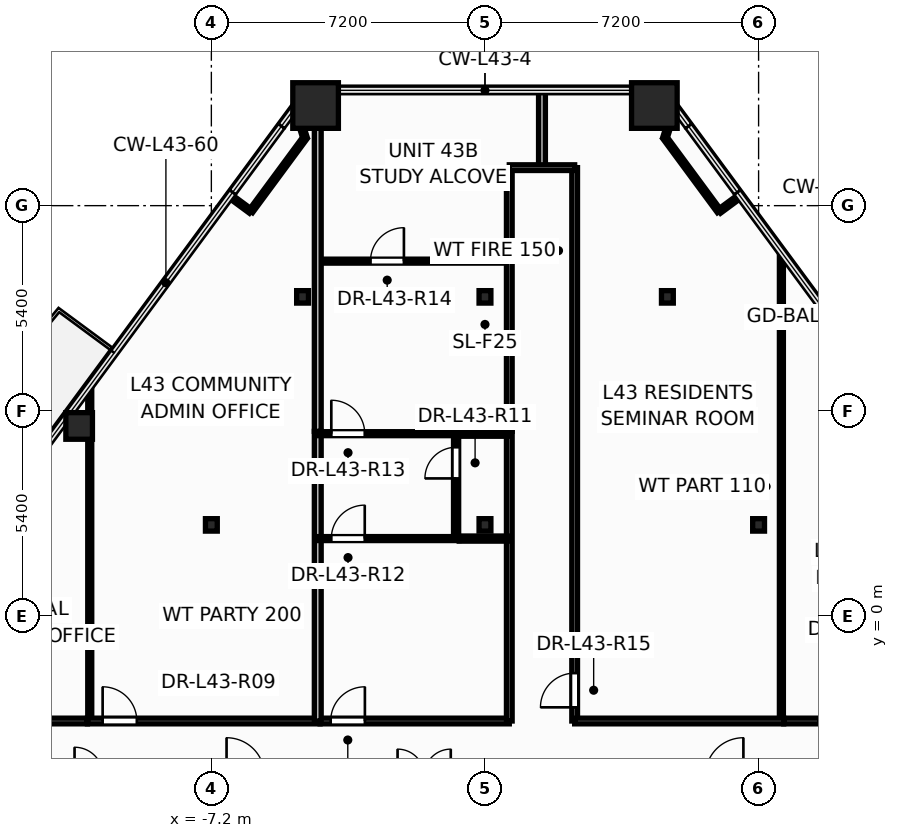
"""IFC4 building model, lengths in metres.
Left out: names, types, materials, properties, quantities, classifications, styles, units other than length and angle.
Written with IfcOpenShell. Run it as: python <this file> out.ifc"""

import sys

from ifc_helpers import new_model, si_unit, direction, frame, frame_2d, origin, origin_2d, place, context, subcontext, project, spatial, rectangle, hollow_rectangle, hollow_circle, i_section, extrude, element, fill, save


model = new_model("IFC4")
c1 = context("Model", 3, precision=1e-05, world=origin(), true_north=direction((0.0, 1.0)))
c2 = subcontext(c1, "Body", "Model", "MODEL_VIEW")
j1 = project(units=[si_unit("LENGTHUNIT", "METRE"), si_unit("PLANEANGLEUNIT", "RADIAN")], contexts=[c1])
p1 = place(None, origin())
s1 = spatial("IfcSite", under=j1, at=p1, CompositionType="ELEMENT")
p2 = place(p1, origin())
s2 = spatial("IfcBuilding", under=s1, at=p2, CompositionType="ELEMENT")
p3 = place(p2, frame((0.0, 0.0, 165.3)))
s3 = spatial("IfcBuildingStorey", under=s2, at=p3, CompositionType="ELEMENT", Elevation=165.3)
for number, where, z_axis, x_axis in (
    (1, (4.457, 13.435, 0.0), (0.0, 0.0, 1.0), (1.0, 0.0, 0.0)),
    (2, (-4.457, 13.435, 0.0), (0.0, 0.0, 1.0), (1.0, 0.0, 0.0)),
):
    element("IfcColumn", number, at=place(p3, frame(where, z_axis=z_axis, x_axis=x_axis)), inside=s3, PredefinedType="COLUMN", context=c2, shape_type="SweptSolid", body=[
        extrude(hollow_rectangle(XDim=1.2, YDim=1.2, WallThickness=0.055, at=origin_2d()), origin(), (0.0, 0.0, 1.0), 3.6),
    ])
p4 = place(p3, frame((-10.679, 5.003, 0.0), z_axis=(0.0, 0.0, 1.0), x_axis=(1.0, 0.0, 0.0)))
e3 = element("IfcColumn", 3, at=p4, inside=s3, PredefinedType="COLUMN", context=c2, shape_type="SweptSolid", body=[
    extrude(hollow_circle(Radius=0.35, WallThickness=0.03, at=origin_2d()), origin(), (0.0, 0.0, 1.0), 3.6),
])
for number, where, z_axis, x_axis in (
    (4, (-7.2, 2.4, 0.0), (0.0, 0.0, 1.0), (1.0, 0.0, 0.0)),
    (5, (0.0, 2.4, 0.0), (0.0, 0.0, 1.0), (1.0, 0.0, 0.0)),
    (6, (7.2, 2.4, 0.0), (0.0, 0.0, 1.0), (1.0, 0.0, 0.0)),
    (7, (-4.8, 8.4, 0.0), (0.0, 0.0, 1.0), (1.0, 0.0, 0.0)),
    (8, (0.0, 8.4, 0.0), (0.0, 0.0, 1.0), (1.0, 0.0, 0.0)),
    (9, (4.8, 8.4, 0.0), (0.0, 0.0, 1.0), (1.0, 0.0, 0.0)),
):
    element("IfcColumn", number, at=place(p3, frame(where, z_axis=z_axis, x_axis=x_axis)), inside=s3, PredefinedType="COLUMN", context=c2, shape_type="SweptSolid", body=[
        extrude(i_section(OverallWidth=0.311, OverallDepth=0.327, WebThickness=0.016, FlangeThickness=0.025, at=origin_2d()), origin(), (0.0, 0.0, 1.0), 3.6),
    ])
p5 = place(p3, frame((2.36, -2.76, 0.0), z_axis=(0.0, 0.0, 1.0), x_axis=(0.0, 1.0, 0.0)))
e10 = element("IfcWall", 10, at=p5, inside=s3, PredefinedType="PARTITIONING", context=c2, shape_type="SweptSolid", body=[
    extrude(rectangle(XDim=14.56, YDim=0.15, at=frame_2d((7.28, 0.0))), origin(), (0.0, 0.0, 1.0), 2.255),
])
p6 = place(p5, frame((0.36, 0.0, 0.0)))
e11 = element("IfcOpeningElement", 11, at=p6, cuts=e10, PredefinedType="OPENING", context=c2, shape_type="SweptSolid", body=[
    extrude(rectangle(XDim=0.906, YDim=2.104, at=frame_2d((0.45, 1.052))), frame((0.0, 0.085, 0.0), z_axis=(0.0, -1.0, 0.0), x_axis=(1.0, 0.0, 0.0)), (0.0, 0.0, 1.0), 0.17),
])
p7 = place(p3, frame((7.8, -2.76, 0.0), z_axis=(0.0, 0.0, 1.0), x_axis=(0.0, 1.0, 0.0)))
e12 = element("IfcWall", 12, at=p7, inside=s3, PredefinedType="PARTITIONING", context=c2, shape_type="SweptSolid", body=[
    extrude(rectangle(XDim=12.338, YDim=0.105, at=frame_2d((6.169, 0.0))), origin(), (0.0, 0.0, 1.0), 2.547),
])
p8 = place(p3, frame((-10.4, -2.76, 0.0), z_axis=(0.0, 0.0, 1.0), x_axis=(0.0, 1.0, 0.0)))
e13 = element("IfcWall", 13, at=p8, inside=s3, PredefinedType="PARTITIONING", context=c2, shape_type="SweptSolid", body=[
    extrude(rectangle(XDim=8.815, YDim=0.105, at=frame_2d((4.408, 0.0))), origin(), (0.0, 0.0, 1.0), 2.547),
])
p9 = place(p3, frame((-10.46, -2.76, 0.0), z_axis=(0.0, 0.0, 1.0), x_axis=(1.0, 0.0, 0.0)))
e14 = element("IfcWall", 14, at=p9, inside=s3, PredefinedType="PARTITIONING", context=c2, shape_type="SweptSolid", body=[
    extrude(rectangle(XDim=6.12, YDim=0.15, at=frame_2d((3.06, 0.0))), origin(), (0.0, 0.0, 1.0), 2.255),
])
p10 = place(p9, frame((0.399, 0.0, 0.0)))
e15 = element("IfcOpeningElement", 15, at=p10, cuts=e14, PredefinedType="OPENING", context=c2, shape_type="SweptSolid", body=[
    extrude(rectangle(XDim=0.906, YDim=2.104, at=frame_2d((0.45, 1.052))), frame((0.0, 0.085, 0.0), z_axis=(0.0, -1.0, 0.0), x_axis=(1.0, 0.0, 0.0)), (0.0, 0.0, 1.0), 0.17),
])
p11 = place(p3, frame((2.36, -2.76, 0.0), z_axis=(0.0, 0.0, 1.0), x_axis=(1.0, 0.0, 0.0)))
e16 = element("IfcWall", 16, at=p11, inside=s3, PredefinedType="PARTITIONING", context=c2, shape_type="SweptSolid", body=[
    extrude(rectangle(XDim=5.5, YDim=0.15, at=frame_2d((2.75, 0.0))), origin(), (0.0, 0.0, 1.0), 2.255),
])
p12 = place(p3, frame((-4.338, -2.76, 0.0), z_axis=(0.0, 0.0, 1.0), x_axis=(1.0, 0.0, 0.0)))
e17 = element("IfcWall", 17, at=p12, inside=s3, PredefinedType="PARTITIONING", context=c2, shape_type="SweptSolid", body=[
    extrude(rectangle(XDim=4.978, YDim=0.15, at=frame_2d((2.489, 0.0))), origin(), (0.0, 0.0, 1.0), 2.255),
])
p13 = place(p12, frame((0.278, 0.0, 0.0)))
e18 = element("IfcOpeningElement", 18, at=p13, cuts=e17, PredefinedType="OPENING", context=c2, shape_type="SweptSolid", body=[
    extrude(rectangle(XDim=0.906, YDim=2.104, at=frame_2d((0.45, 1.052))), frame((0.0, 0.085, 0.0), z_axis=(0.0, -1.0, 0.0), x_axis=(1.0, 0.0, 0.0)), (0.0, 0.0, 1.0), 0.17),
])
p14 = place(p3, frame((-4.4, 9.34, 0.0), z_axis=(0.0, 0.0, 1.0), x_axis=(1.0, 0.0, 0.0)))
e19 = element("IfcWall", 19, at=p14, inside=s3, PredefinedType="PARTITIONING", context=c2, shape_type="SweptSolid", body=[
    extrude(rectangle(XDim=5.04, YDim=0.105, at=frame_2d((2.52, 0.0))), origin(), (0.0, 0.0, 1.0), 3.28),
])
p15 = place(p14, frame((1.387, 0.0, 0.0)))
e20 = element("IfcOpeningElement", 20, at=p15, cuts=e19, PredefinedType="OPENING", context=c2, shape_type="SweptSolid", body=[
    extrude(rectangle(XDim=0.886, YDim=2.104, at=frame_2d((0.44, 1.052))), frame((0.0, 0.062, 0.0), z_axis=(0.0, -1.0, 0.0), x_axis=(1.0, 0.0, 0.0)), (0.0, 0.0, 1.0), 0.125),
])
p16 = place(p3, frame((0.64, -2.76, 0.0), z_axis=(0.0, 0.0, 1.0), x_axis=(0.0, 1.0, 0.0)))
e21 = element("IfcWall", 21, at=p16, inside=s3, PredefinedType="PARTITIONING", context=c2, shape_type="SweptSolid", body=[
    extrude(rectangle(XDim=7.62, YDim=0.15, at=frame_2d((3.81, 0.0))), origin(), (0.0, 0.0, 1.0), 2.255),
])
p17 = place(p3, frame((-4.4, -2.76, 0.0), z_axis=(0.0, 0.0, 1.0), x_axis=(0.0, 1.0, 0.0)))
e22 = element("IfcWall", 22, at=p17, inside=s3, PredefinedType="PARTITIONING", context=c2, shape_type="SweptSolid", body=[
    extrude(rectangle(XDim=7.62, YDim=0.18, at=frame_2d((3.81, 0.0))), origin(), (0.0, 0.0, 1.0), 2.255),
])
p18 = place(p3, frame((7.862, -2.76, 0.0), z_axis=(0.0, 0.0, 1.0), x_axis=(1.0, 0.0, 0.0)))
e23 = element("IfcWall", 23, at=p18, inside=s3, PredefinedType="PARTITIONING", context=c2, shape_type="SweptSolid", body=[
    extrude(rectangle(XDim=4.638, YDim=0.15, at=frame_2d((2.319, 0.0))), origin(), (0.0, 0.0, 1.0), 3.28),
])
p19 = place(p18, frame((0.913, 0.0, 0.0)))
e24 = element("IfcOpeningElement", 24, at=p19, cuts=e23, PredefinedType="OPENING", context=c2, shape_type="SweptSolid", body=[
    extrude(rectangle(XDim=0.906, YDim=2.104, at=frame_2d((0.45, 1.052))), frame((0.0, 0.085, 0.0), z_axis=(0.0, -1.0, 0.0), x_axis=(1.0, 0.0, 0.0)), (0.0, 0.0, 1.0), 0.17),
])
p20 = place(p3, frame((0.64, 4.862, 0.0), z_axis=(0.0, 0.0, 1.0), x_axis=(0.0, 1.0, 0.0)))
e25 = element("IfcWall", 25, at=p20, inside=s3, PredefinedType="PARTITIONING", context=c2, shape_type="SweptSolid", body=[
    extrude(rectangle(XDim=6.938, YDim=0.15, at=frame_2d((3.469, 0.0))), origin(), (0.0, 0.0, 1.0), 2.547),
])
p21 = place(p3, frame((-4.4, 4.862, 0.0), z_axis=(0.0, 0.0, 1.0), x_axis=(0.0, 1.0, 0.0)))
e26 = element("IfcWall", 26, at=p21, inside=s3, PredefinedType="PARTITIONING", context=c2, shape_type="SweptSolid", body=[
    extrude(rectangle(XDim=8.973, YDim=0.18, at=frame_2d((4.486, 0.0))), origin(), (0.0, 0.0, 1.0), 2.547),
])
p22 = place(p3, frame((-14.64, -2.76, 0.0), z_axis=(0.0, 0.0, 1.0), x_axis=(1.0, 0.0, 0.0)))
e27 = element("IfcWall", 27, at=p22, inside=s3, PredefinedType="PARTITIONING", context=c2, shape_type="SweptSolid", body=[
    extrude(rectangle(XDim=4.178, YDim=0.15, at=frame_2d((2.089, 0.0))), origin(), (0.0, 0.0, 1.0), 3.28),
])
p23 = place(p22, frame((0.357, 0.0, 0.0)))
e28 = element("IfcOpeningElement", 28, at=p23, cuts=e27, PredefinedType="OPENING", context=c2, shape_type="SweptSolid", body=[
    extrude(rectangle(XDim=0.906, YDim=2.104, at=frame_2d((0.45, 1.052))), frame((0.0, 0.085, 0.0), z_axis=(0.0, -1.0, 0.0), x_axis=(1.0, 0.0, 0.0)), (0.0, 0.0, 1.0), 0.17),
])
p24 = place(p3, frame((-4.4, 2.04, 0.0), z_axis=(0.0, 0.0, 1.0), x_axis=(1.0, 0.0, 0.0)))
e29 = element("IfcWall", 29, at=p24, inside=s3, PredefinedType="PARTITIONING", context=c2, shape_type="SweptSolid", body=[
    extrude(rectangle(XDim=3.72, YDim=0.105, at=frame_2d((1.86, 0.0))), origin(), (0.0, 0.0, 1.0), 2.849),
])
p25 = place(p24, frame((0.356, 0.0, 0.0)))
e30 = element("IfcOpeningElement", 30, at=p25, cuts=e29, PredefinedType="OPENING", context=c2, shape_type="SweptSolid", body=[
    extrude(rectangle(XDim=0.886, YDim=2.104, at=frame_2d((0.44, 1.052))), frame((0.0, 0.062, 0.0), z_axis=(0.0, -1.0, 0.0), x_axis=(1.0, 0.0, 0.0)), (0.0, 0.0, 1.0), 0.125),
])
p26 = place(p3, frame((-4.4, 4.8, 0.0), z_axis=(0.0, 0.0, 1.0), x_axis=(1.0, 0.0, 0.0)))
e31 = element("IfcWall", 31, at=p26, inside=s3, PredefinedType="PARTITIONING", context=c2, shape_type="SweptSolid", body=[
    extrude(rectangle(XDim=3.64, YDim=0.105, at=frame_2d((1.82, 0.0))), origin(), (0.0, 0.0, 1.0), 2.849),
])
p27 = place(p26, frame((0.356, 0.0, 0.0)))
e32 = element("IfcOpeningElement", 32, at=p27, cuts=e31, PredefinedType="OPENING", context=c2, shape_type="SweptSolid", body=[
    extrude(rectangle(XDim=0.886, YDim=2.104, at=frame_2d((0.44, 1.052))), frame((0.0, 0.062, 0.0), z_axis=(0.0, -1.0, 0.0), x_axis=(1.0, 0.0, 0.0)), (0.0, 0.0, 1.0), 0.125),
])
p28 = place(p3, frame((-0.76, 2.04, 0.0), z_axis=(0.0, 0.0, 1.0), x_axis=(0.0, 1.0, 0.0)))
e33 = element("IfcWall", 33, at=p28, inside=s3, PredefinedType="PARTITIONING", context=c2, shape_type="SweptSolid", body=[
    extrude(rectangle(XDim=2.76, YDim=0.135, at=frame_2d((1.38, 0.0))), origin(), (0.0, 0.0, 1.0), 2.255),
])
p29 = place(p28, frame((1.583, 0.0, 0.0)))
e34 = element("IfcOpeningElement", 34, at=p29, cuts=e33, PredefinedType="OPENING", context=c2, shape_type="SweptSolid", body=[
    extrude(rectangle(XDim=0.826, YDim=2.104, at=frame_2d((0.41, 1.052))), frame((0.0, 0.078, 0.0), z_axis=(0.0, -1.0, 0.0), x_axis=(1.0, 0.0, 0.0)), (0.0, 0.0, 1.0), 0.155),
])
for number, where, z_axis, x_axis in (
    (35, (-4.736, 12.585, 0.0), (0.0, 0.0, 1.0), (-0.594, -0.805, 0.0)),
    (36, (6.164, 10.65, 0.0), (0.0, 0.0, 1.0), (-0.594, 0.805, 0.0)),
):
    element("IfcWall", number, at=place(p3, frame(where, z_axis=z_axis, x_axis=x_axis)), inside=s3, PredefinedType="PARTITIONING", context=c2, shape_type="SweptSolid", body=[
        extrude(rectangle(XDim=2.404, YDim=0.12, at=frame_2d((1.202, 0.0))), origin(), (0.0, 0.0, 1.0), 3.28),
    ])
p30 = place(p3, frame((1.5, 11.8, 0.0), z_axis=(0.0, 0.0, 1.0), x_axis=(0.0, 1.0, 0.0)))
e37 = element("IfcWall", 37, at=p30, inside=s3, PredefinedType="PARTITIONING", context=c2, shape_type="SweptSolid", body=[
    extrude(rectangle(XDim=2.035, YDim=0.18, at=frame_2d((1.017, 0.0))), origin(), (0.0, 0.0, 1.0), 2.722),
])
p31 = place(p3, frame((-0.678, 2.04, 0.0), z_axis=(0.0, 0.0, 1.0), x_axis=(1.0, 0.0, 0.0)))
e38 = element("IfcWall", 38, at=p31, inside=s3, PredefinedType="PARTITIONING", context=c2, shape_type="SweptSolid", body=[
    extrude(rectangle(XDim=1.318, YDim=0.135, at=frame_2d((0.659, 0.0))), origin(), (0.0, 0.0, 1.0), 2.255),
])
p32 = place(p3, frame((-0.76, 4.8, 0.0), z_axis=(0.0, 0.0, 1.0), x_axis=(1.0, 0.0, 0.0)))
e39 = element("IfcWall", 39, at=p32, inside=s3, PredefinedType="PARTITIONING", context=c2, shape_type="SweptSolid", body=[
    extrude(rectangle(XDim=1.4, YDim=0.135, at=frame_2d((0.7, 0.0))), origin(), (0.0, 0.0, 1.0), 2.255),
])
p33 = place(p3, frame((0.64, 11.8, 0.0), z_axis=(0.0, 0.0, 1.0), x_axis=(1.0, 0.0, 0.0)))
e40 = element("IfcWall", 40, at=p33, inside=s3, PredefinedType="PARTITIONING", context=c2, shape_type="SweptSolid", body=[
    extrude(rectangle(XDim=1.72, YDim=0.15, at=frame_2d((0.86, 0.0))), origin(), (0.0, 0.0, 1.0), 3.28),
])
for number, where, z_axis, x_axis in (
    (41, (-4.985, 13.376, 0.0), (0.0, 0.0, 1.0), (0.3, -0.954, 0.0)),
    (42, (4.736, 12.585, 0.0), (0.0, 0.0, 1.0), (0.3, 0.954, 0.0)),
):
    element("IfcWall", number, at=place(p3, frame(where, z_axis=z_axis, x_axis=x_axis)), inside=s3, PredefinedType="PARTITIONING", context=c2, shape_type="SweptSolid", body=[
        extrude(rectangle(XDim=0.83, YDim=0.12, at=frame_2d((0.415, 0.0))), origin(), (0.0, 0.0, 1.0), 2.547),
    ])
for number, where, z_axis, x_axis in (
    (43, (-6.164, 10.65, 0.0), (0.0, 0.0, 1.0), (-0.805, 0.594, 0.0)),
    (44, (6.703, 11.048, 0.0), (0.0, 0.0, 1.0), (-0.805, -0.594, 0.0)),
):
    element("IfcWall", number, at=place(p3, frame(where, z_axis=z_axis, x_axis=x_axis)), inside=s3, PredefinedType="PARTITIONING", context=c2, shape_type="SweptSolid", body=[
        extrude(rectangle(XDim=0.67, YDim=0.12, at=frame_2d((0.335, 0.0))), origin(), (0.0, 0.0, 1.0), 2.722),
    ])
p34 = place(p10, origin())
e45 = element("IfcDoor", 45, at=p34, inside=s3, OperationType="SINGLE_SWING_LEFT", PredefinedType="DOOR", context=c2, shape_type="SweptSolid", body=[
    extrude(rectangle(XDim=0.9, YDim=2.1, at=frame_2d((0.45, 1.05))), frame((0.0, 0.025, 0.0), z_axis=(0.0, -1.0, 0.0), x_axis=(1.0, 0.0, 0.0)), (0.0, 0.0, 1.0), 0.05),
])
fill(e15, e45)
p35 = place(p13, origin())
e46 = element("IfcDoor", 46, at=p35, inside=s3, OperationType="SINGLE_SWING_RIGHT", PredefinedType="DOOR", context=c2, shape_type="SweptSolid", body=[
    extrude(rectangle(XDim=0.9, YDim=2.1, at=frame_2d((0.45, 1.05))), frame((0.0, 0.025, 0.0), z_axis=(0.0, -1.0, 0.0), x_axis=(1.0, 0.0, 0.0)), (0.0, 0.0, 1.0), 0.05),
])
fill(e18, e46)
p36 = place(p29, origin())
e47 = element("IfcDoor", 47, at=p36, inside=s3, OperationType="SINGLE_SWING_LEFT", PredefinedType="DOOR", context=c2, shape_type="SweptSolid", body=[
    extrude(rectangle(XDim=0.82, YDim=2.1, at=frame_2d((0.41, 1.05))), frame((0.0, 0.025, 0.0), z_axis=(0.0, -1.0, 0.0), x_axis=(1.0, 0.0, 0.0)), (0.0, 0.0, 1.0), 0.05),
])
fill(e34, e47)
p37 = place(p25, origin())
e48 = element("IfcDoor", 48, at=p37, inside=s3, OperationType="SINGLE_SWING_RIGHT", PredefinedType="DOOR", context=c2, shape_type="SweptSolid", body=[
    extrude(rectangle(XDim=0.88, YDim=2.1, at=frame_2d((0.44, 1.05))), frame((0.0, 0.025, 0.0), z_axis=(0.0, -1.0, 0.0), x_axis=(1.0, 0.0, 0.0)), (0.0, 0.0, 1.0), 0.05),
])
fill(e30, e48)
p38 = place(p27, origin())
e49 = element("IfcDoor", 49, at=p38, inside=s3, OperationType="SINGLE_SWING_LEFT", PredefinedType="DOOR", context=c2, shape_type="SweptSolid", body=[
    extrude(rectangle(XDim=0.88, YDim=2.1, at=frame_2d((0.44, 1.05))), frame((0.0, 0.025, 0.0), z_axis=(0.0, -1.0, 0.0), x_axis=(1.0, 0.0, 0.0)), (0.0, 0.0, 1.0), 0.05),
])
fill(e32, e49)
p39 = place(p15, origin())
e50 = element("IfcDoor", 50, at=p39, inside=s3, OperationType="SINGLE_SWING_RIGHT", PredefinedType="DOOR", context=c2, shape_type="SweptSolid", body=[
    extrude(rectangle(XDim=0.88, YDim=2.1, at=frame_2d((0.44, 1.05))), frame((0.0, 0.025, 0.0), z_axis=(0.0, -1.0, 0.0), x_axis=(1.0, 0.0, 0.0)), (0.0, 0.0, 1.0), 0.05),
])
fill(e20, e50)
p40 = place(p6, origin())
e51 = element("IfcDoor", 51, at=p40, inside=s3, OperationType="SINGLE_SWING_LEFT", PredefinedType="DOOR", context=c2, shape_type="SweptSolid", body=[
    extrude(rectangle(XDim=0.9, YDim=2.1, at=frame_2d((0.45, 1.05))), frame((0.0, 0.025, 0.0), z_axis=(0.0, -1.0, 0.0), x_axis=(1.0, 0.0, 0.0)), (0.0, 0.0, 1.0), 0.05),
])
fill(e11, e51)
p41 = place(p19, origin())
e52 = element("IfcDoor", 52, at=p41, inside=s3, OperationType="SINGLE_SWING_RIGHT", PredefinedType="DOOR", context=c2, shape_type="SweptSolid", body=[
    extrude(rectangle(XDim=0.9, YDim=2.1, at=frame_2d((0.45, 1.05))), frame((0.0, 0.025, 0.0), z_axis=(0.0, -1.0, 0.0), x_axis=(1.0, 0.0, 0.0)), (0.0, 0.0, 1.0), 0.05),
])
fill(e24, e52)
save(model, sys.argv[1])
